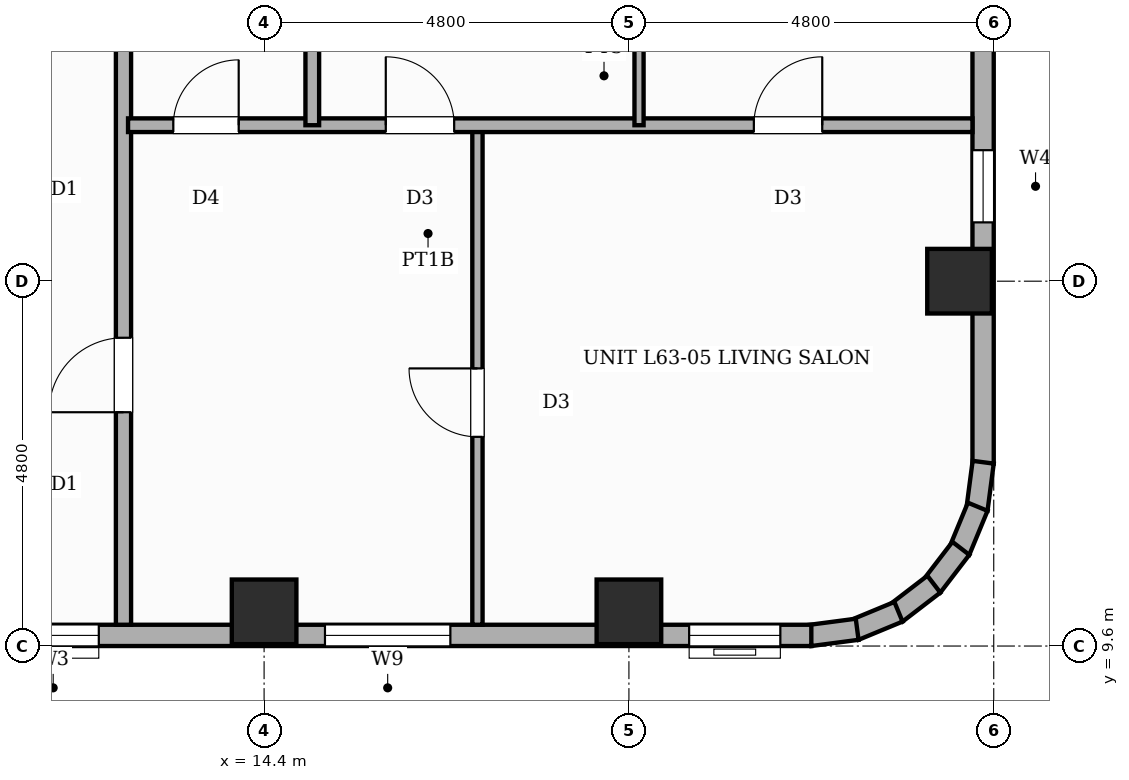
"""IFC4 building model, lengths in metres.
Left out: names, types, materials, properties, quantities, classifications, styles, units other than length and angle.
Written with IfcOpenShell. Run it as: python <this file> out.ifc"""

import sys

from ifc_helpers import new_model, si_unit, direction, frame, frame_2d, origin, origin_2d, place, context, subcontext, project, spatial, rectangle, extrude, element, fill, save


model = new_model("IFC4")
c1 = context("Model", 3, precision=1e-05, world=origin(), true_north=direction((0.0, 1.0)))
c2 = subcontext(c1, "Body", "Model", "MODEL_VIEW")
j1 = project(units=[si_unit("LENGTHUNIT", "METRE"), si_unit("PLANEANGLEUNIT", "RADIAN")], contexts=[c1])
p1 = place(None, origin())
s1 = spatial("IfcSite", under=j1, at=p1, CompositionType="ELEMENT")
p2 = place(p1, origin())
s2 = spatial("IfcBuilding", under=s1, at=p2, CompositionType="ELEMENT")
p3 = place(p2, frame((0.0, 0.0, 239.8)))
s3 = spatial("IfcBuildingStorey", under=s2, at=p3, CompositionType="ELEMENT", Elevation=239.8)
for number, where, z_axis, x_axis in (
    (1, (14.4, 10.05, 0.0), (0.0, 0.0, 1.0), (1.0, 0.0, 0.0)),
    (2, (19.2, 10.05, 0.0), (0.0, 0.0, 1.0), (1.0, 0.0, 0.0)),
    (3, (23.55, 14.4, 0.0), (0.0, 0.0, 1.0), (1.0, 0.0, 0.0)),
):
    element("IfcColumn", number, at=place(p3, frame(where, z_axis=z_axis, x_axis=x_axis)), inside=s3, PredefinedType="COLUMN", context=c2, shape_type="SweptSolid", body=[
        extrude(rectangle(XDim=0.85, YDim=0.85, at=origin_2d()), origin(), (0.0, 0.0, 1.0), 4.3),
    ])
p4 = place(p3, frame((23.86, 45.6, 0.0), z_axis=(0.0, 0.0, 1.0), x_axis=(0.0, -1.0, 0.0)))
e4 = element("IfcWall", 4, at=p4, inside=s3, PredefinedType="STANDARD", context=c2, shape_type="SweptSolid", body=[
    extrude(rectangle(XDim=33.6, YDim=0.28, at=frame_2d((16.8, 0.0))), origin(), (0.0, 0.0, 1.0), 3.32),
])
p5 = place(p4, frame((3.5, 0.0, 0.0)))
e5 = element("IfcOpeningElement", 5, at=p5, cuts=e4, PredefinedType="OPENING", context=c2, shape_type="SweptSolid", body=[
    extrude(rectangle(XDim=1.3, YDim=2.2, at=frame_2d((0.65, 1.1))), frame((0.0, 0.15, 0.0), z_axis=(0.0, -1.0, 0.0), x_axis=(1.0, 0.0, 0.0)), (0.0, 0.0, 1.0), 0.3),
])
p6 = place(p4, frame((23.45, 0.0, 0.0)))
e6 = element("IfcOpeningElement", 6, at=p6, cuts=e4, PredefinedType="OPENING", context=c2, shape_type="SweptSolid", body=[
    extrude(rectangle(XDim=1.1, YDim=2.15, at=frame_2d((0.55, 1.075))), frame((0.0, 0.15, 0.0), z_axis=(0.0, -1.0, 0.0), x_axis=(1.0, 0.0, 0.0)), (0.0, 0.0, 1.0), 0.3),
])
p7 = place(p4, frame((22.505, 0.0, 0.45)))
e7 = element("IfcOpeningElement", 7, at=p7, cuts=e4, PredefinedType="OPENING", context=c2, shape_type="SweptSolid", body=[
    extrude(rectangle(XDim=0.6, YDim=1.8, at=frame_2d((0.3, 0.9))), frame((0.0, 0.15, 0.0), z_axis=(0.0, -1.0, 0.0), x_axis=(1.0, 0.0, 0.0)), (0.0, 0.0, 1.0), 0.3),
])
p8 = place(p4, frame((0.407, 0.0, 0.8)))
e8 = element("IfcOpeningElement", 8, at=p8, cuts=e4, PredefinedType="OPENING", context=c2, shape_type="SweptSolid", body=[
    extrude(rectangle(XDim=1.2, YDim=1.8, at=frame_2d((0.6, 0.9))), frame((0.0, 0.15, 0.0), z_axis=(0.0, -1.0, 0.0), x_axis=(1.0, 0.0, 0.0)), (0.0, 0.0, 1.0), 0.3),
])
p9 = place(p4, frame((29.477, 0.0, 0.8)))
e9 = element("IfcOpeningElement", 9, at=p9, cuts=e4, PredefinedType="OPENING", context=c2, shape_type="SweptSolid", body=[
    extrude(rectangle(XDim=0.95, YDim=1.8, at=frame_2d((0.475, 0.9))), frame((0.0, 0.15, 0.0), z_axis=(0.0, -1.0, 0.0), x_axis=(1.0, 0.0, 0.0)), (0.0, 0.0, 1.0), 0.3),
])
p10 = place(p4, frame((20.133, 0.0, 0.45)))
e10 = element("IfcOpeningElement", 10, at=p10, cuts=e4, PredefinedType="OPENING", context=c2, shape_type="SweptSolid", body=[
    extrude(rectangle(XDim=0.75, YDim=1.8, at=frame_2d((0.375, 0.9))), frame((0.0, 0.15, 0.0), z_axis=(0.0, -1.0, 0.0), x_axis=(1.0, 0.0, 0.0)), (0.0, 0.0, 1.0), 0.3),
])
for number, where, z_axis, x_axis in (
    (11, (23.861, 12.018, 0.0), (0.0, 0.0, 1.0), (-0.131, -0.991, 0.0)),
    (12, (23.789, 11.432, 0.0), (0.0, 0.0, 1.0), (-0.382, -0.924, 0.0)),
    (13, (23.567, 10.885, 0.0), (0.0, 0.0, 1.0), (-0.609, -0.793, 0.0)),
    (14, (23.212, 10.414, 0.0), (0.0, 0.0, 1.0), (-0.793, -0.609, 0.0)),
    (15, (22.746, 10.051, 0.0), (0.0, 0.0, 1.0), (-0.924, -0.383, 0.0)),
    (16, (22.203, 9.821, 0.0), (0.0, 0.0, 1.0), (-0.991, -0.131, 0.0)),
):
    element("IfcWall", number, at=place(p3, frame(where, z_axis=z_axis, x_axis=x_axis)), inside=s3, PredefinedType="STANDARD", context=c2, shape_type="SweptSolid", body=[
        extrude(rectangle(XDim=0.626, YDim=0.28, at=frame_2d((0.313, 0.0))), origin(), (0.0, 0.0, 1.0), 4.04),
    ])
p11 = place(p3, frame((21.6, 9.74, 0.0), z_axis=(0.0, 0.0, 1.0), x_axis=(-1.0, 0.0, 0.0)))
e17 = element("IfcWall", 17, at=p11, inside=s3, PredefinedType="STANDARD", context=c2, shape_type="SweptSolid", body=[
    extrude(rectangle(XDim=14.4, YDim=0.28, at=frame_2d((7.2, 0.0))), origin(), (0.0, 0.0, 1.0), 3.32),
])
p12 = place(p11, frame((9.375, 0.0, 0.8)))
e18 = element("IfcOpeningElement", 18, at=p12, cuts=e17, PredefinedType="OPENING", context=c2, shape_type="SweptSolid", body=[
    extrude(rectangle(XDim=1.2, YDim=1.8, at=frame_2d((0.6, 0.9))), frame((0.0, 0.15, 0.0), z_axis=(0.0, -1.0, 0.0), x_axis=(1.0, 0.0, 0.0)), (0.0, 0.0, 1.0), 0.3),
])
p13 = place(p11, frame((12.792, 0.0, 0.8)))
e19 = element("IfcOpeningElement", 19, at=p13, cuts=e17, PredefinedType="OPENING", context=c2, shape_type="SweptSolid", body=[
    extrude(rectangle(XDim=1.2, YDim=1.8, at=frame_2d((0.6, 0.9))), frame((0.0, 0.15, 0.0), z_axis=(0.0, -1.0, 0.0), x_axis=(1.0, 0.0, 0.0)), (0.0, 0.0, 1.0), 0.3),
])
p14 = place(p11, frame((4.749, 0.0, 0.8)))
e20 = element("IfcOpeningElement", 20, at=p14, cuts=e17, PredefinedType="OPENING", context=c2, shape_type="SweptSolid", body=[
    extrude(rectangle(XDim=1.65, YDim=1.95, at=frame_2d((0.825, 0.975))), frame((0.0, 0.15, 0.0), z_axis=(0.0, -1.0, 0.0), x_axis=(1.0, 0.0, 0.0)), (0.0, 0.0, 1.0), 0.3),
])
p15 = place(p11, frame((0.407, 0.0, 0.8)))
e21 = element("IfcOpeningElement", 21, at=p15, cuts=e17, PredefinedType="OPENING", context=c2, shape_type="SweptSolid", body=[
    extrude(rectangle(XDim=1.2, YDim=1.8, at=frame_2d((0.6, 0.9))), frame((0.0, 0.15, 0.0), z_axis=(0.0, -1.0, 0.0), x_axis=(1.0, 0.0, 0.0)), (0.0, 0.0, 1.0), 0.3),
])
p16 = place(p3, frame((12.55, 9.88, 0.0), z_axis=(0.0, 0.0, 1.0), x_axis=(0.0, 1.0, 0.0)))
e22 = element("IfcWall", 22, at=p16, inside=s3, PredefinedType="PARTITIONING", context=c2, shape_type="SweptSolid", body=[
    extrude(rectangle(XDim=13.52, YDim=0.2, at=frame_2d((6.76, 0.0))), origin(), (0.0, 0.0, 1.0), 4.04),
])
p17 = place(p16, frame((2.796, 0.0, 0.0)))
e23 = element("IfcOpeningElement", 23, at=p17, cuts=e22, PredefinedType="OPENING", context=c2, shape_type="SweptSolid", body=[
    extrude(rectangle(XDim=0.98, YDim=2.18, at=frame_2d((0.49, 1.09))), frame((0.0, 0.11, 0.0), z_axis=(0.0, -1.0, 0.0), x_axis=(1.0, 0.0, 0.0)), (0.0, 0.0, 1.0), 0.22),
])
p18 = place(p3, frame((17.207, 9.88, 0.0), z_axis=(0.0, 0.0, 1.0), x_axis=(0.0, 1.0, 0.0)))
e24 = element("IfcWall", 24, at=p18, inside=s3, PredefinedType="PARTITIONING", context=c2, shape_type="SweptSolid", body=[
    extrude(rectangle(XDim=6.572, YDim=0.135, at=frame_2d((3.286, 0.0))), origin(), (0.0, 0.0, 1.0), 4.04),
])
p19 = place(p18, frame((2.472, 0.0, 0.0)))
e25 = element("IfcOpeningElement", 25, at=p19, cuts=e24, PredefinedType="OPENING", context=c2, shape_type="SweptSolid", body=[
    extrude(rectangle(XDim=0.9, YDim=2.15, at=frame_2d((0.45, 1.075))), frame((0.0, 0.078, 0.0), z_axis=(0.0, -1.0, 0.0), x_axis=(1.0, 0.0, 0.0)), (0.0, 0.0, 1.0), 0.155),
])
p20 = place(p3, frame((12.61, 16.452, 0.0), z_axis=(0.0, 0.0, 1.0), x_axis=(1.0, 0.0, 0.0)))
e26 = element("IfcWall", 26, at=p20, inside=s3, PredefinedType="PLUMBINGWALL", context=c2, shape_type="SweptSolid", body=[
    extrude(rectangle(XDim=11.11, YDim=0.18, at=frame_2d((5.555, 0.0))), origin(), (0.0, 0.0, 1.0), 4.04),
])
p21 = place(p20, frame((0.596, 0.0, 0.0)))
e27 = element("IfcOpeningElement", 27, at=p21, cuts=e26, PredefinedType="OPENING", context=c2, shape_type="SweptSolid", body=[
    extrude(rectangle(XDim=0.86, YDim=2.1, at=frame_2d((0.43, 1.05))), frame((0.0, 0.1, 0.0), z_axis=(0.0, -1.0, 0.0), x_axis=(1.0, 0.0, 0.0)), (0.0, 0.0, 1.0), 0.2),
])
p22 = place(p20, frame((3.391, 0.0, 0.0)))
e28 = element("IfcOpeningElement", 28, at=p22, cuts=e26, PredefinedType="OPENING", context=c2, shape_type="SweptSolid", body=[
    extrude(rectangle(XDim=0.9, YDim=2.15, at=frame_2d((0.45, 1.075))), frame((0.0, 0.1, 0.0), z_axis=(0.0, -1.0, 0.0), x_axis=(1.0, 0.0, 0.0)), (0.0, 0.0, 1.0), 0.2),
])
p23 = place(p20, frame((8.234, 0.0, 0.0)))
e29 = element("IfcOpeningElement", 29, at=p23, cuts=e26, PredefinedType="OPENING", context=c2, shape_type="SweptSolid", body=[
    extrude(rectangle(XDim=0.9, YDim=2.15, at=frame_2d((0.45, 1.075))), frame((0.0, 0.1, 0.0), z_axis=(0.0, -1.0, 0.0), x_axis=(1.0, 0.0, 0.0)), (0.0, 0.0, 1.0), 0.2),
])
p24 = place(p3, frame((15.034, 16.452, 0.0), z_axis=(0.0, 0.0, 1.0), x_axis=(0.0, 1.0, 0.0)))
e30 = element("IfcWall", 30, at=p24, inside=s3, PredefinedType="PLUMBINGWALL", context=c2, shape_type="SweptSolid", body=[
    extrude(rectangle(XDim=6.888, YDim=0.18, at=frame_2d((3.444, 0.0))), origin(), (0.0, 0.0, 1.0), 4.04),
])
p25 = place(p3, frame((19.333, 16.452, 0.0), z_axis=(0.0, 0.0, 1.0), x_axis=(0.0, 1.0, 0.0)))
e31 = element("IfcWall", 31, at=p25, inside=s3, PredefinedType="PARTITIONING", context=c2, shape_type="SweptSolid", body=[
    extrude(rectangle(XDim=6.888, YDim=0.12, at=frame_2d((3.444, 0.0))), origin(), (0.0, 0.0, 1.0), 4.04),
])
p26 = place(p9, origin())
e32 = element("IfcWindow", 32, at=p26, inside=s3, PartitioningType="SINGLE_PANEL", PredefinedType="WINDOW", context=c2, shape_type="SweptSolid", body=[
    extrude(rectangle(XDim=0.95, YDim=1.8, at=frame_2d((0.475, 0.9))), frame((0.0, 0.03, 0.0), z_axis=(0.0, -1.0, 0.0), x_axis=(1.0, 0.0, 0.0)), (0.0, 0.0, 1.0), 0.06),
])
fill(e9, e32)
p27 = place(p12, origin())
e33 = element("IfcWindow", 33, at=p27, inside=s3, PartitioningType="SINGLE_PANEL", PredefinedType="WINDOW", context=c2, shape_type="SweptSolid", body=[
    extrude(rectangle(XDim=1.2, YDim=1.8, at=frame_2d((0.6, 0.9))), frame((0.0, 0.03, 0.0), z_axis=(0.0, -1.0, 0.0), x_axis=(1.0, 0.0, 0.0)), (0.0, 0.0, 1.0), 0.06),
])
fill(e18, e33)
p28 = place(p14, origin())
e34 = element("IfcWindow", 34, at=p28, inside=s3, PartitioningType="SINGLE_PANEL", PredefinedType="WINDOW", context=c2, shape_type="SweptSolid", body=[
    extrude(rectangle(XDim=1.65, YDim=1.95, at=frame_2d((0.825, 0.975))), frame((0.0, 0.03, 0.0), z_axis=(0.0, -1.0, 0.0), x_axis=(1.0, 0.0, 0.0)), (0.0, 0.0, 1.0), 0.06),
])
fill(e20, e34)
p29 = place(p15, origin())
e35 = element("IfcWindow", 35, at=p29, inside=s3, PartitioningType="SINGLE_PANEL", PredefinedType="WINDOW", context=c2, shape_type="SweptSolid", body=[
    extrude(rectangle(XDim=1.2, YDim=1.8, at=frame_2d((0.6, 0.9))), frame((0.0, 0.03, 0.0), z_axis=(0.0, -1.0, 0.0), x_axis=(1.0, 0.0, 0.0)), (0.0, 0.0, 1.0), 0.06),
])
fill(e21, e35)
p30 = place(p17, origin())
e36 = element("IfcDoor", 36, at=p30, inside=s3, OperationType="SINGLE_SWING_LEFT", PredefinedType="DOOR", context=c2, shape_type="SweptSolid", body=[
    extrude(rectangle(XDim=0.98, YDim=2.18, at=frame_2d((0.49, 1.09))), frame((0.0, 0.025, 0.0), z_axis=(0.0, -1.0, 0.0), x_axis=(1.0, 0.0, 0.0)), (0.0, 0.0, 1.0), 0.05),
])
fill(e23, e36)
p31 = place(p19, origin())
e37 = element("IfcDoor", 37, at=p31, inside=s3, OperationType="SINGLE_SWING_RIGHT", PredefinedType="DOOR", context=c2, shape_type="SweptSolid", body=[
    extrude(rectangle(XDim=0.9, YDim=2.15, at=frame_2d((0.45, 1.075))), frame((0.0, 0.025, 0.0), z_axis=(0.0, -1.0, 0.0), x_axis=(1.0, 0.0, 0.0)), (0.0, 0.0, 1.0), 0.05),
])
fill(e25, e37)
p32 = place(p21, origin())
e38 = element("IfcDoor", 38, at=p32, inside=s3, OperationType="SINGLE_SWING_RIGHT", PredefinedType="DOOR", context=c2, shape_type="SweptSolid", body=[
    extrude(rectangle(XDim=0.86, YDim=2.1, at=frame_2d((0.43, 1.05))), frame((0.0, 0.025, 0.0), z_axis=(0.0, -1.0, 0.0), x_axis=(1.0, 0.0, 0.0)), (0.0, 0.0, 1.0), 0.05),
])
fill(e27, e38)
p33 = place(p22, origin())
e39 = element("IfcDoor", 39, at=p33, inside=s3, OperationType="SINGLE_SWING_LEFT", PredefinedType="DOOR", context=c2, shape_type="SweptSolid", body=[
    extrude(rectangle(XDim=0.9, YDim=2.15, at=frame_2d((0.45, 1.075))), frame((0.0, 0.025, 0.0), z_axis=(0.0, -1.0, 0.0), x_axis=(1.0, 0.0, 0.0)), (0.0, 0.0, 1.0), 0.05),
])
fill(e28, e39)
p34 = place(p23, origin())
e40 = element("IfcDoor", 40, at=p34, inside=s3, OperationType="SINGLE_SWING_RIGHT", PredefinedType="DOOR", context=c2, shape_type="SweptSolid", body=[
    extrude(rectangle(XDim=0.9, YDim=2.15, at=frame_2d((0.45, 1.075))), frame((0.0, 0.025, 0.0), z_axis=(0.0, -1.0, 0.0), x_axis=(1.0, 0.0, 0.0)), (0.0, 0.0, 1.0), 0.05),
])
fill(e29, e40)
save(model, sys.argv[1])
